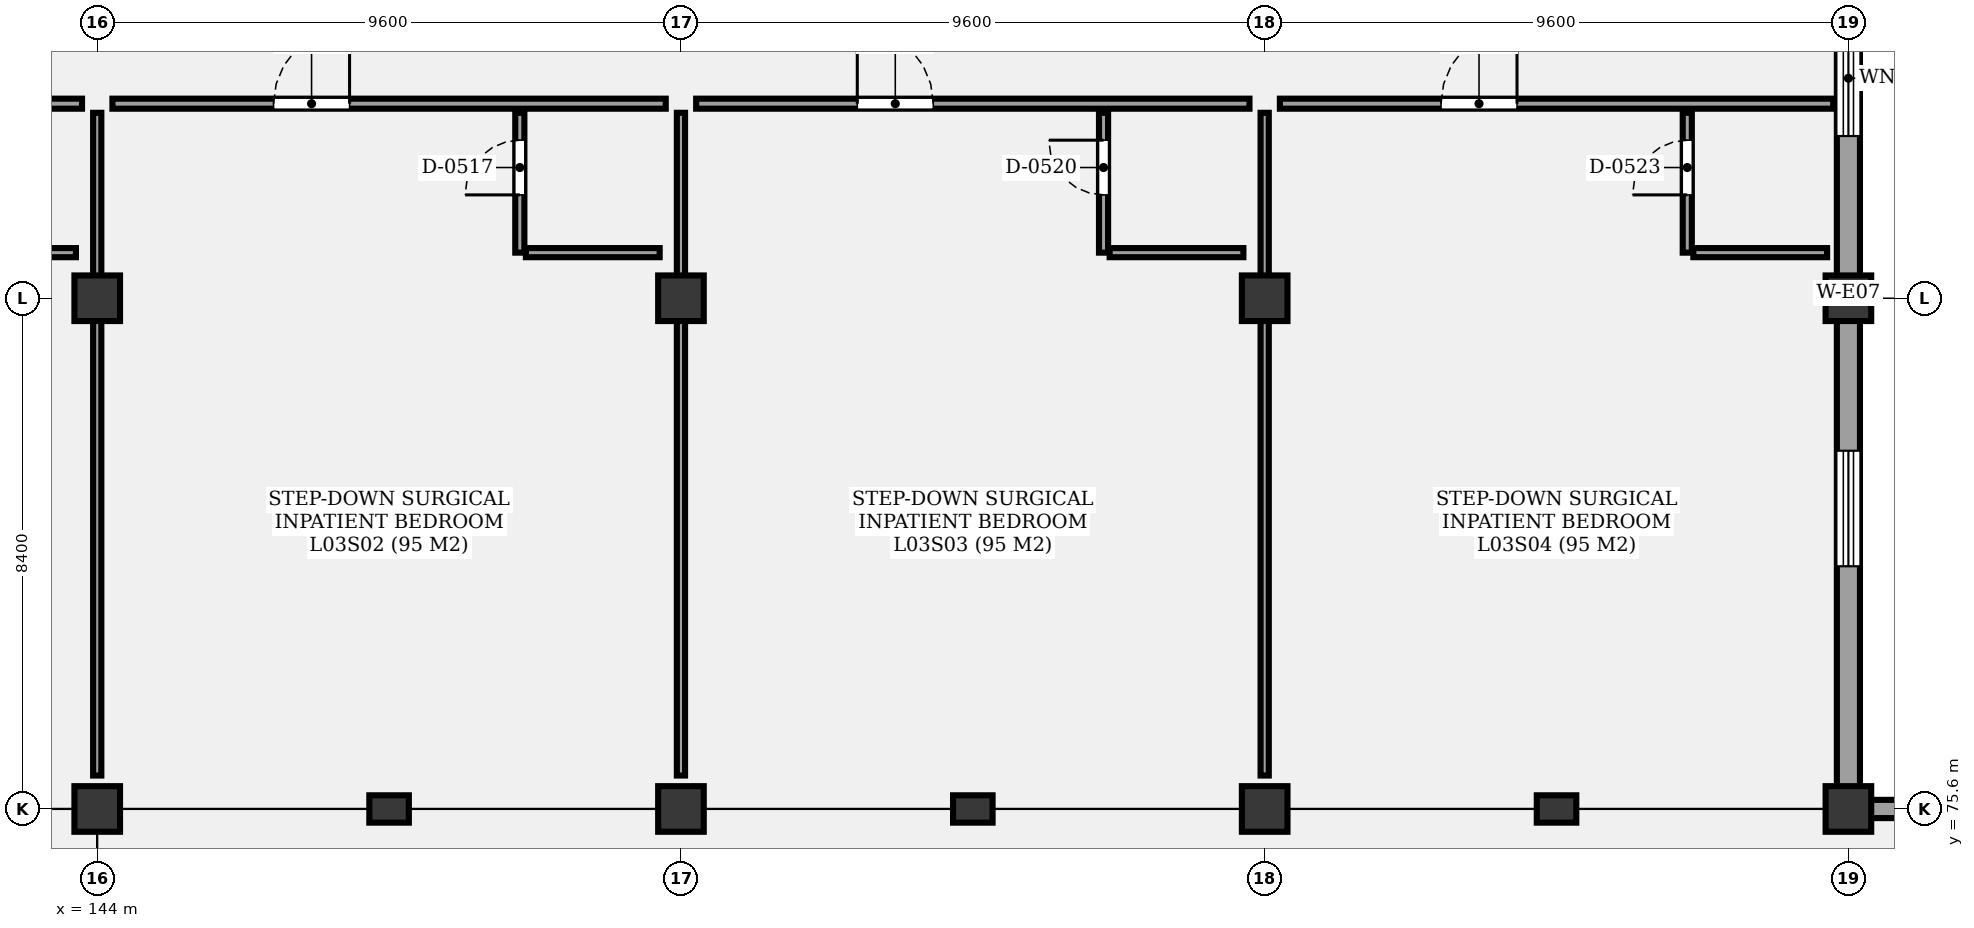
"""IFC4 building model, lengths in metres.
Left out: names, types, materials, properties, quantities, classifications, styles, units other than length and angle.
Written with IfcOpenShell. Run it as: python <this file> out.ifc"""

import sys

from ifc_helpers import new_model, si_unit, direction, frame, frame_2d, origin, origin_2d, place, context, subcontext, project, spatial, rectangle, extrude, element, fill, save


model = new_model("IFC4")
c1 = context("Model", 3, precision=1e-05, world=origin(), true_north=direction((0.0, 1.0)))
c2 = subcontext(c1, "Body", "Model", "MODEL_VIEW")
j1 = project(units=[si_unit("LENGTHUNIT", "METRE"), si_unit("PLANEANGLEUNIT", "RADIAN")], contexts=[c1])
p1 = place(None, origin())
s1 = spatial("IfcSite", under=j1, at=p1, CompositionType="ELEMENT")
p2 = place(p1, origin())
s2 = spatial("IfcBuilding", under=s1, at=p2, CompositionType="ELEMENT")
p3 = place(p2, frame((0.0, 0.0, 13.5)))
s3 = spatial("IfcBuildingStorey", under=s2, at=p3, CompositionType="ELEMENT", Elevation=13.5)
for number, where, z_axis, x_axis in (
    (1, (144.0, 75.6, 0.0), (0.0, 0.0, 1.0), (1.0, 0.0, 0.0)),
    (2, (144.0, 84.0, 0.0), (0.0, 0.0, 1.0), (1.0, 0.0, 0.0)),
    (3, (153.6, 75.6, 0.0), (0.0, 0.0, 1.0), (1.0, 0.0, 0.0)),
    (4, (153.6, 84.0, 0.0), (0.0, 0.0, 1.0), (1.0, 0.0, 0.0)),
    (5, (163.2, 75.6, 0.0), (0.0, 0.0, 1.0), (1.0, 0.0, 0.0)),
    (6, (163.2, 84.0, 0.0), (0.0, 0.0, 1.0), (1.0, 0.0, 0.0)),
    (7, (172.8, 75.6, 0.0), (0.0, 0.0, 1.0), (1.0, 0.0, 0.0)),
    (8, (172.8, 84.0, 0.0), (0.0, 0.0, 1.0), (1.0, 0.0, 0.0)),
):
    element("IfcColumn", number, at=place(p3, frame(where, z_axis=z_axis, x_axis=x_axis)), inside=s3, PredefinedType="COLUMN", context=c2, shape_type="SweptSolid", body=[
        extrude(rectangle(XDim=0.75, YDim=0.75, at=origin_2d()), origin(), (0.0, 0.0, 1.0), 4.3),
    ])
for number, where, z_axis, x_axis in (
    (9, (148.8, 75.6, 0.0), (0.0, 0.0, 1.0), (1.0, 0.0, 0.0)),
    (10, (158.4, 75.6, 0.0), (0.0, 0.0, 1.0), (1.0, 0.0, 0.0)),
    (11, (168.0, 75.6, 0.0), (0.0, 0.0, 1.0), (1.0, 0.0, 0.0)),
):
    element("IfcColumn", number, at=place(p3, frame(where, z_axis=z_axis, x_axis=x_axis)), inside=s3, PredefinedType="PILASTER", context=c2, shape_type="SweptSolid", body=[
        extrude(rectangle(XDim=0.65, YDim=0.45, at=origin_2d()), origin(), (0.0, 0.0, 1.0), 4.3),
    ])
p4 = place(p3, frame((172.8, 75.6, 0.0), z_axis=(0.0, 0.0, 1.0), x_axis=(1.0, 0.0, 0.0)))
e12 = element("IfcWall", 12, at=p4, inside=s3, PredefinedType="SOLIDWALL", context=c2, shape_type="SweptSolid", body=[
    extrude(rectangle(XDim=9.6, YDim=0.3, at=frame_2d((4.8, 0.0))), origin(), (0.0, 0.0, 1.0), 3.49),
])
p5 = place(p4, frame((4.225, 0.0, 0.85)))
e13 = element("IfcOpeningElement", 13, at=p5, cuts=e12, PredefinedType="OPENING", context=c2, shape_type="SweptSolid", body=[
    extrude(rectangle(XDim=1.15, YDim=1.6, at=frame_2d((0.575, 0.8))), frame((0.0, 0.16, 0.0), z_axis=(0.0, -1.0, 0.0), x_axis=(1.0, 0.0, 0.0)), (0.0, 0.0, 1.0), 0.32),
])
p6 = place(p3, frame((172.8, 92.4, 0.0), z_axis=(0.0, 0.0, 1.0), x_axis=(0.0, -1.0, 0.0)))
e14 = element("IfcWall", 14, at=p6, inside=s3, PredefinedType="SOLIDWALL", context=c2, shape_type="SweptSolid", body=[
    extrude(rectangle(XDim=16.64, YDim=0.38, at=frame_2d((8.32, 0.0))), origin(), (0.0, 0.0, 1.0), 3.49),
])
p7 = place(p6, frame((3.832, 0.0, 0.85)))
e15 = element("IfcOpeningElement", 15, at=p7, cuts=e14, PredefinedType="OPENING", context=c2, shape_type="SweptSolid", body=[
    extrude(rectangle(XDim=1.9, YDim=1.2, at=frame_2d((0.95, 0.6))), frame((0.0, 0.2, 0.0), z_axis=(0.0, -1.0, 0.0), x_axis=(1.0, 0.0, 0.0)), (0.0, 0.0, 1.0), 0.4),
])
p8 = place(p6, frame((10.908, 0.0, 0.85)))
e16 = element("IfcOpeningElement", 16, at=p8, cuts=e14, PredefinedType="OPENING", context=c2, shape_type="SweptSolid", body=[
    extrude(rectangle(XDim=1.9, YDim=1.2, at=frame_2d((0.95, 0.6))), frame((0.0, 0.2, 0.0), z_axis=(0.0, -1.0, 0.0), x_axis=(1.0, 0.0, 0.0)), (0.0, 0.0, 1.0), 0.4),
])
p9 = place(p3, frame((134.65, 87.2, 0.0), z_axis=(0.0, 0.0, 1.0), x_axis=(1.0, 0.0, 0.0)))
e17 = element("IfcWall", 17, at=p9, inside=s3, PredefinedType="PARTITIONING", context=c2, shape_type="SweptSolid", body=[
    extrude(rectangle(XDim=9.1, YDim=0.165, at=frame_2d((4.55, 0.0))), origin(), (0.0, 0.0, 1.0), 3.4),
])
p10 = place(p9, frame((2.65, 0.0, 0.0)))
e18 = element("IfcOpeningElement", 18, at=p10, cuts=e17, PredefinedType="OPENING", context=c2, shape_type="SweptSolid", body=[
    extrude(rectangle(XDim=1.25, YDim=2.2, at=frame_2d((0.625, 1.1))), frame((0.0, 0.093, 0.0), z_axis=(0.0, -1.0, 0.0), x_axis=(1.0, 0.0, 0.0)), (0.0, 0.0, 1.0), 0.185),
])
p11 = place(p3, frame((141.45, 84.75, 0.0), z_axis=(0.0, 0.0, 1.0), x_axis=(1.0, 0.0, 0.0)))
e19 = element("IfcWall", 19, at=p11, inside=s3, PredefinedType="PARTITIONING", context=c2, shape_type="SweptSolid", body=[
    extrude(rectangle(XDim=2.2, YDim=0.15, at=frame_2d((1.1, 0.0))), origin(), (0.0, 0.0, 1.0), 3.4),
])
p12 = place(p3, frame((144.25, 87.2, 0.0), z_axis=(0.0, 0.0, 1.0), x_axis=(1.0, 0.0, 0.0)))
e20 = element("IfcWall", 20, at=p12, inside=s3, PredefinedType="PARTITIONING", context=c2, shape_type="SweptSolid", body=[
    extrude(rectangle(XDim=9.1, YDim=0.165, at=frame_2d((4.55, 0.0))), origin(), (0.0, 0.0, 1.0), 3.4),
])
p13 = place(p12, frame((2.65, 0.0, 0.0)))
e21 = element("IfcOpeningElement", 21, at=p13, cuts=e20, PredefinedType="OPENING", context=c2, shape_type="SweptSolid", body=[
    extrude(rectangle(XDim=1.25, YDim=2.2, at=frame_2d((0.625, 1.1))), frame((0.0, 0.093, 0.0), z_axis=(0.0, -1.0, 0.0), x_axis=(1.0, 0.0, 0.0)), (0.0, 0.0, 1.0), 0.185),
])
p14 = place(p3, frame((150.95, 84.75, 0.0), z_axis=(0.0, 0.0, 1.0), x_axis=(0.0, 1.0, 0.0)))
e22 = element("IfcWall", 22, at=p14, inside=s3, PredefinedType="PARTITIONING", context=c2, shape_type="SweptSolid", body=[
    extrude(rectangle(XDim=2.3, YDim=0.15, at=frame_2d((1.15, 0.0))), origin(), (0.0, 0.0, 1.0), 3.4),
])
p15 = place(p14, frame((0.95, 0.0, 0.0)))
e23 = element("IfcOpeningElement", 23, at=p15, cuts=e22, PredefinedType="OPENING", context=c2, shape_type="SweptSolid", body=[
    extrude(rectangle(XDim=0.9, YDim=2.1, at=frame_2d((0.45, 1.05))), frame((0.0, 0.085, 0.0), z_axis=(0.0, -1.0, 0.0), x_axis=(1.0, 0.0, 0.0)), (0.0, 0.0, 1.0), 0.17),
])
p16 = place(p3, frame((151.05, 84.75, 0.0), z_axis=(0.0, 0.0, 1.0), x_axis=(1.0, 0.0, 0.0)))
e24 = element("IfcWall", 24, at=p16, inside=s3, PredefinedType="PARTITIONING", context=c2, shape_type="SweptSolid", body=[
    extrude(rectangle(XDim=2.2, YDim=0.15, at=frame_2d((1.1, 0.0))), origin(), (0.0, 0.0, 1.0), 3.4),
])
p17 = place(p3, frame((144.0, 76.15, 0.0), z_axis=(0.0, 0.0, 1.0), x_axis=(0.0, 1.0, 0.0)))
e25 = element("IfcWall", 25, at=p17, inside=s3, PredefinedType="PARTITIONING", context=c2, shape_type="SweptSolid", body=[
    extrude(rectangle(XDim=10.9, YDim=0.135, at=frame_2d((5.45, 0.0))), origin(), (0.0, 0.0, 1.0), 3.4),
])
p18 = place(p3, frame((153.85, 87.2, 0.0), z_axis=(0.0, 0.0, 1.0), x_axis=(1.0, 0.0, 0.0)))
e26 = element("IfcWall", 26, at=p18, inside=s3, PredefinedType="PARTITIONING", context=c2, shape_type="SweptSolid", body=[
    extrude(rectangle(XDim=9.1, YDim=0.165, at=frame_2d((4.55, 0.0))), origin(), (0.0, 0.0, 1.0), 3.4),
])
p19 = place(p18, frame((2.65, 0.0, 0.0)))
e27 = element("IfcOpeningElement", 27, at=p19, cuts=e26, PredefinedType="OPENING", context=c2, shape_type="SweptSolid", body=[
    extrude(rectangle(XDim=1.25, YDim=2.2, at=frame_2d((0.625, 1.1))), frame((0.0, 0.093, 0.0), z_axis=(0.0, -1.0, 0.0), x_axis=(1.0, 0.0, 0.0)), (0.0, 0.0, 1.0), 0.185),
])
p20 = place(p3, frame((160.55, 84.75, 0.0), z_axis=(0.0, 0.0, 1.0), x_axis=(0.0, 1.0, 0.0)))
e28 = element("IfcWall", 28, at=p20, inside=s3, PredefinedType="PARTITIONING", context=c2, shape_type="SweptSolid", body=[
    extrude(rectangle(XDim=2.3, YDim=0.15, at=frame_2d((1.15, 0.0))), origin(), (0.0, 0.0, 1.0), 3.4),
])
p21 = place(p20, frame((0.95, 0.0, 0.0)))
e29 = element("IfcOpeningElement", 29, at=p21, cuts=e28, PredefinedType="OPENING", context=c2, shape_type="SweptSolid", body=[
    extrude(rectangle(XDim=0.9, YDim=2.1, at=frame_2d((0.45, 1.05))), frame((0.0, 0.085, 0.0), z_axis=(0.0, -1.0, 0.0), x_axis=(1.0, 0.0, 0.0)), (0.0, 0.0, 1.0), 0.17),
])
p22 = place(p3, frame((160.65, 84.75, 0.0), z_axis=(0.0, 0.0, 1.0), x_axis=(1.0, 0.0, 0.0)))
e30 = element("IfcWall", 30, at=p22, inside=s3, PredefinedType="PARTITIONING", context=c2, shape_type="SweptSolid", body=[
    extrude(rectangle(XDim=2.2, YDim=0.15, at=frame_2d((1.1, 0.0))), origin(), (0.0, 0.0, 1.0), 3.4),
])
p23 = place(p3, frame((153.6, 76.15, 0.0), z_axis=(0.0, 0.0, 1.0), x_axis=(0.0, 1.0, 0.0)))
e31 = element("IfcWall", 31, at=p23, inside=s3, PredefinedType="PARTITIONING", context=c2, shape_type="SweptSolid", body=[
    extrude(rectangle(XDim=10.9, YDim=0.135, at=frame_2d((5.45, 0.0))), origin(), (0.0, 0.0, 1.0), 3.4),
])
p24 = place(p3, frame((163.45, 87.2, 0.0), z_axis=(0.0, 0.0, 1.0), x_axis=(1.0, 0.0, 0.0)))
e32 = element("IfcWall", 32, at=p24, inside=s3, PredefinedType="PARTITIONING", context=c2, shape_type="SweptSolid", body=[
    extrude(rectangle(XDim=9.1, YDim=0.165, at=frame_2d((4.55, 0.0))), origin(), (0.0, 0.0, 1.0), 3.4),
])
p25 = place(p24, frame((2.65, 0.0, 0.0)))
e33 = element("IfcOpeningElement", 33, at=p25, cuts=e32, PredefinedType="OPENING", context=c2, shape_type="SweptSolid", body=[
    extrude(rectangle(XDim=1.25, YDim=2.2, at=frame_2d((0.625, 1.1))), frame((0.0, 0.093, 0.0), z_axis=(0.0, -1.0, 0.0), x_axis=(1.0, 0.0, 0.0)), (0.0, 0.0, 1.0), 0.185),
])
p26 = place(p3, frame((170.15, 84.75, 0.0), z_axis=(0.0, 0.0, 1.0), x_axis=(0.0, 1.0, 0.0)))
e34 = element("IfcWall", 34, at=p26, inside=s3, PredefinedType="PARTITIONING", context=c2, shape_type="SweptSolid", body=[
    extrude(rectangle(XDim=2.3, YDim=0.15, at=frame_2d((1.15, 0.0))), origin(), (0.0, 0.0, 1.0), 3.4),
])
p27 = place(p26, frame((0.95, 0.0, 0.0)))
e35 = element("IfcOpeningElement", 35, at=p27, cuts=e34, PredefinedType="OPENING", context=c2, shape_type="SweptSolid", body=[
    extrude(rectangle(XDim=0.9, YDim=2.1, at=frame_2d((0.45, 1.05))), frame((0.0, 0.085, 0.0), z_axis=(0.0, -1.0, 0.0), x_axis=(1.0, 0.0, 0.0)), (0.0, 0.0, 1.0), 0.17),
])
p28 = place(p3, frame((170.25, 84.75, 0.0), z_axis=(0.0, 0.0, 1.0), x_axis=(1.0, 0.0, 0.0)))
e36 = element("IfcWall", 36, at=p28, inside=s3, PredefinedType="PARTITIONING", context=c2, shape_type="SweptSolid", body=[
    extrude(rectangle(XDim=2.2, YDim=0.15, at=frame_2d((1.1, 0.0))), origin(), (0.0, 0.0, 1.0), 3.4),
])
p29 = place(p3, frame((163.2, 76.15, 0.0), z_axis=(0.0, 0.0, 1.0), x_axis=(0.0, 1.0, 0.0)))
e37 = element("IfcWall", 37, at=p29, inside=s3, PredefinedType="PARTITIONING", context=c2, shape_type="SweptSolid", body=[
    extrude(rectangle(XDim=10.9, YDim=0.135, at=frame_2d((5.45, 0.0))), origin(), (0.0, 0.0, 1.0), 3.4),
])
p30 = place(p7, origin())
e38 = element("IfcWindow", 38, at=p30, inside=s3, PartitioningType="SINGLE_PANEL", PredefinedType="WINDOW", context=c2, shape_type="SweptSolid", body=[
    extrude(rectangle(XDim=1.9, YDim=1.2, at=frame_2d((0.95, 0.6))), frame((0.0, 0.03, 0.0), z_axis=(0.0, -1.0, 0.0), x_axis=(1.0, 0.0, 0.0)), (0.0, 0.0, 1.0), 0.06),
])
fill(e15, e38)
p31 = place(p8, origin())
e39 = element("IfcWindow", 39, at=p31, inside=s3, PartitioningType="SINGLE_PANEL", PredefinedType="WINDOW", context=c2, shape_type="SweptSolid", body=[
    extrude(rectangle(XDim=1.9, YDim=1.2, at=frame_2d((0.95, 0.6))), frame((0.0, 0.03, 0.0), z_axis=(0.0, -1.0, 0.0), x_axis=(1.0, 0.0, 0.0)), (0.0, 0.0, 1.0), 0.06),
])
fill(e16, e39)
p32 = place(p13, origin())
e40 = element("IfcDoor", 40, at=p32, inside=s3, OperationType="SINGLE_SWING_RIGHT", PredefinedType="DOOR", context=c2, shape_type="SweptSolid", body=[
    extrude(rectangle(XDim=1.25, YDim=2.2, at=frame_2d((0.625, 1.1))), frame((0.0, 0.025, 0.0), z_axis=(0.0, -1.0, 0.0), x_axis=(1.0, 0.0, 0.0)), (0.0, 0.0, 1.0), 0.05),
])
fill(e21, e40)
p33 = place(p15, origin())
e41 = element("IfcDoor", 41, at=p33, inside=s3, OperationType="SINGLE_SWING_LEFT", PredefinedType="DOOR", context=c2, shape_type="SweptSolid", body=[
    extrude(rectangle(XDim=0.9, YDim=2.1, at=frame_2d((0.45, 1.05))), frame((0.0, 0.025, 0.0), z_axis=(0.0, -1.0, 0.0), x_axis=(1.0, 0.0, 0.0)), (0.0, 0.0, 1.0), 0.05),
])
fill(e23, e41)
p34 = place(p19, origin())
e42 = element("IfcDoor", 42, at=p34, inside=s3, OperationType="SINGLE_SWING_LEFT", PredefinedType="DOOR", context=c2, shape_type="SweptSolid", body=[
    extrude(rectangle(XDim=1.25, YDim=2.2, at=frame_2d((0.625, 1.1))), frame((0.0, 0.025, 0.0), z_axis=(0.0, -1.0, 0.0), x_axis=(1.0, 0.0, 0.0)), (0.0, 0.0, 1.0), 0.05),
])
fill(e27, e42)
p35 = place(p21, origin())
e43 = element("IfcDoor", 43, at=p35, inside=s3, OperationType="SINGLE_SWING_RIGHT", PredefinedType="DOOR", context=c2, shape_type="SweptSolid", body=[
    extrude(rectangle(XDim=0.9, YDim=2.1, at=frame_2d((0.45, 1.05))), frame((0.0, 0.025, 0.0), z_axis=(0.0, -1.0, 0.0), x_axis=(1.0, 0.0, 0.0)), (0.0, 0.0, 1.0), 0.05),
])
fill(e29, e43)
p36 = place(p25, origin())
e44 = element("IfcDoor", 44, at=p36, inside=s3, OperationType="SINGLE_SWING_RIGHT", PredefinedType="DOOR", context=c2, shape_type="SweptSolid", body=[
    extrude(rectangle(XDim=1.25, YDim=2.2, at=frame_2d((0.625, 1.1))), frame((0.0, 0.025, 0.0), z_axis=(0.0, -1.0, 0.0), x_axis=(1.0, 0.0, 0.0)), (0.0, 0.0, 1.0), 0.05),
])
fill(e33, e44)
p37 = place(p27, origin())
e45 = element("IfcDoor", 45, at=p37, inside=s3, OperationType="SINGLE_SWING_LEFT", PredefinedType="DOOR", context=c2, shape_type="SweptSolid", body=[
    extrude(rectangle(XDim=0.9, YDim=2.1, at=frame_2d((0.45, 1.05))), frame((0.0, 0.025, 0.0), z_axis=(0.0, -1.0, 0.0), x_axis=(1.0, 0.0, 0.0)), (0.0, 0.0, 1.0), 0.05),
])
fill(e35, e45)
save(model, sys.argv[1])
